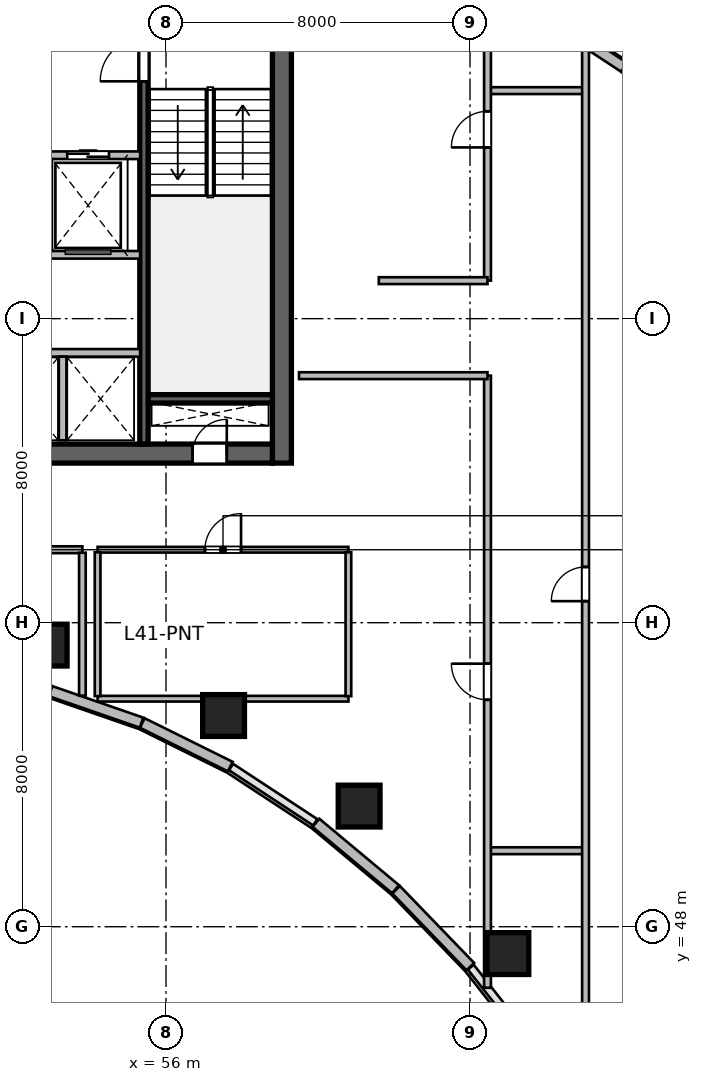
"""IFC4 building model, lengths in metres.
Left out: names, types, materials, properties, quantities, classifications, styles, units other than length and angle.
Written with IfcOpenShell. Run it as: python <this file> out.ifc"""

import sys

from ifc_helpers import new_model, si_unit, direction, frame, frame_2d, origin, origin_2d, place, context, subcontext, project, spatial, rectangle, circle, extrude, source, transform, mapped, element, fill, save


model = new_model("IFC4")
c1 = context("Model", 3, precision=1e-05, world=origin(), true_north=direction((0.0, 1.0)))
c2 = subcontext(c1, "Body", "Model", "MODEL_VIEW")
j1 = project(units=[si_unit("LENGTHUNIT", "METRE"), si_unit("PLANEANGLEUNIT", "RADIAN")], contexts=[c1])
p1 = place(None, origin())
s1 = spatial("IfcSite", under=j1, at=p1, CompositionType="ELEMENT")
p2 = place(p1, origin())
s2 = spatial("IfcBuilding", under=s1, at=p2, CompositionType="ELEMENT")
p3 = place(p2, frame((0.0, 0.0, 170.1)))
s3 = spatial("IfcBuildingStorey", under=s2, at=p3, CompositionType="ELEMENT", Elevation=170.1)
m1 = source(origin(), c2, "Body", "SweptSolid", [
    extrude(rectangle(XDim=12.0, YDim=0.5, at=frame_2d((6.0, 0.0))), origin(), (0.0, 0.0, 1.0), 3.9),
])
p4 = place(p3, frame((59.05, 60.2, 0.0), z_axis=(0.0, 0.0, 1.0), x_axis=(0.0, 1.0, 0.0)))
e1 = element("IfcWall", 1, at=p4, inside=s3, PredefinedType="SHEAR", context=c2, shape_type="MappedRepresentation", body=[
    mapped(m1, transform((0.0, 0.0, 0.0), scale=1.0)),
])
m2 = source(origin(), c2, "Body", "SweptSolid", [
    extrude(rectangle(XDim=21.6, YDim=0.5, at=frame_2d((10.8, 0.0))), origin(), (0.0, 0.0, 1.0), 3.9),
])
p5 = place(p3, frame((37.2, 60.45, 0.0), z_axis=(0.0, 0.0, 1.0), x_axis=(1.0, 0.0, 0.0)))
e2 = element("IfcWall", 2, at=p5, inside=s3, PredefinedType="SHEAR", context=c2, shape_type="MappedRepresentation", body=[
    mapped(m2, transform((0.0, 0.0, 0.0), scale=1.0)),
])
p6 = place(p5, frame((1.1, 0.0, 0.0)))
e3 = element("IfcOpeningElement", 3, at=p6, cuts=e2, PredefinedType="OPENING", context=c2, shape_type="SweptSolid", body=[
    extrude(rectangle(XDim=1.15, YDim=2.15, at=frame_2d((0.575, 1.075))), frame((0.0, 0.26, 0.0), z_axis=(0.0, -1.0, 0.0), x_axis=(1.0, 0.0, 0.0)), (0.0, 0.0, 1.0), 0.52),
])
p7 = place(p5, frame((19.5, 0.0, 0.0)))
e4 = element("IfcOpeningElement", 4, at=p7, cuts=e2, PredefinedType="OPENING", context=c2, shape_type="SweptSolid", body=[
    extrude(rectangle(XDim=0.9, YDim=2.1, at=frame_2d((0.45, 1.05))), frame((0.0, 0.26, 0.0), z_axis=(0.0, -1.0, 0.0), x_axis=(1.0, 0.0, 0.0)), (0.0, 0.0, 1.0), 0.52),
])
p8 = place(p5, frame((12.02, 0.0, 0.0)))
e5 = element("IfcOpeningElement", 5, at=p8, cuts=e2, PredefinedType="OPENING", context=c2, shape_type="SweptSolid", body=[
    extrude(rectangle(XDim=1.6, YDim=2.15, at=frame_2d((0.8, 1.075))), frame((0.0, 0.26, 0.0), z_axis=(0.0, -1.0, 0.0), x_axis=(1.0, 0.0, 0.0)), (0.0, 0.0, 1.0), 0.52),
])
m3 = source(origin(), c2, "Body", "SweptSolid", [
    extrude(rectangle(XDim=3.27, YDim=0.22, at=frame_2d((1.635, 0.0))), origin(), (0.0, 0.0, 1.0), 3.9),
])
p9 = place(p3, frame((55.53, 61.89, 0.0), z_axis=(0.0, 0.0, 1.0), x_axis=(1.0, 0.0, 0.0)))
e6 = element("IfcWall", 6, at=p9, inside=s3, PredefinedType="SHEAR", context=c2, shape_type="MappedRepresentation", body=[
    mapped(m3, transform((0.0, 0.0, 0.0), scale=1.0)),
])
m4 = source(origin(), c2, "Body", "SweptSolid", [
    extrude(rectangle(XDim=11.0, YDim=0.22, at=frame_2d((5.5, 0.0))), origin(), (0.0, 0.0, 1.0), 3.9),
])
p10 = place(p3, frame((55.42, 60.7, 0.0), z_axis=(0.0, 0.0, 1.0), x_axis=(0.0, 1.0, 0.0)))
e7 = element("IfcWall", 7, at=p10, inside=s3, PredefinedType="SHEAR", context=c2, shape_type="MappedRepresentation", body=[
    mapped(m4, transform((0.0, 0.0, 0.0), scale=1.0)),
])
p11 = place(p10, frame((9.545, 0.0, 0.0)))
e8 = element("IfcOpeningElement", 8, at=p11, cuts=e7, PredefinedType="OPENING", context=c2, shape_type="SweptSolid", body=[
    extrude(rectangle(XDim=1.15, YDim=2.15, at=frame_2d((0.575, 1.075))), frame((0.0, 0.12, 0.0), z_axis=(0.0, -1.0, 0.0), x_axis=(1.0, 0.0, 0.0)), (0.0, 0.0, 1.0), 0.24),
])
m5 = source(origin(), c2, "Body", "SweptSolid", [
    extrude(circle(Radius=0.55, at=origin_2d()), origin(), (0.0, 0.0, 1.0), 3.9),
])
for number, where, z_axis, x_axis in (
    (9, (52.846, 55.411, 0.0), (0.0, 0.0, 1.0), (0.143, 0.99, 0.0)),
    (10, (57.515, 53.558, 0.0), (0.0, 0.0, 1.0), (0.289, 0.957, 0.0)),
    (11, (61.082, 51.175, 0.0), (0.0, 0.0, 1.0), (0.409, 0.912, 0.0)),
    (12, (64.996, 47.294, 0.0), (0.0, 0.0, 1.0), (0.558, 0.83, 0.0)),
):
    element("IfcColumn", number, at=place(p3, frame(where, z_axis=z_axis, x_axis=x_axis)), inside=s3, PredefinedType="COLUMN", context=c2, shape_type="MappedRepresentation", body=[
        mapped(m5, transform((0.0, 0.0, 0.0), scale=1.0)),
    ])
m6 = source(origin(), c2, "Body", "SweptSolid", [
    extrude(rectangle(XDim=2.812, YDim=0.28, at=frame_2d((1.406, 0.0))), origin(), (0.0, 0.0, 1.0), 3.65),
])
p12 = place(p3, frame((64.008, 46.95, 0.0), z_axis=(0.0, 0.0, 1.0), x_axis=(-0.694583668785, 0.719411931411, 0.0)))
e13 = element("IfcWall", 13, at=p12, inside=s3, PredefinedType="SOLIDWALL", context=c2, shape_type="MappedRepresentation", body=[
    mapped(m6, transform((0.0, 0.0, 0.0), scale=1.0)),
])
m7 = source(origin(), c2, "Body", "SweptSolid", [
    extrude(rectangle(XDim=2.729, YDim=0.28, at=frame_2d((1.365, 0.0))), origin(), (0.0, 0.0, 1.0), 3.65),
])
p13 = place(p3, frame((62.041, 48.987, 0.0), z_axis=(0.0, 0.0, 1.0), x_axis=(-0.767957284255, 0.640501061326, 0.0)))
e14 = element("IfcWall", 14, at=p13, inside=s3, PredefinedType="SOLIDWALL", context=c2, shape_type="MappedRepresentation", body=[
    mapped(m7, transform((0.0, 0.0, 0.0), scale=1.0)),
])
m8 = source(origin(), c2, "Body", "SweptSolid", [
    extrude(rectangle(XDim=2.584, YDim=0.28, at=frame_2d((1.292, 0.0))), origin(), (0.0, 0.0, 1.0), 3.65),
])
p14 = place(p3, frame((57.692, 52.213, 0.0), z_axis=(0.0, 0.0, 1.0), x_axis=(-0.895989792847, 0.44407464588, 0.0)))
e15 = element("IfcWall", 15, at=p14, inside=s3, PredefinedType="SOLIDWALL", context=c2, shape_type="MappedRepresentation", body=[
    mapped(m8, transform((0.0, 0.0, 0.0), scale=1.0)),
])
m9 = source(origin(), c2, "Body", "SweptSolid", [
    extrude(rectangle(XDim=2.53, YDim=0.28, at=frame_2d((1.265, 0.0))), origin(), (0.0, 0.0, 1.0), 3.65),
])
p15 = place(p3, frame((55.355, 53.37, 0.0), z_axis=(0.0, 0.0, 1.0), x_axis=(-0.944872429646, 0.327438683872, 0.0)))
e16 = element("IfcWall", 16, at=p15, inside=s3, PredefinedType="SOLIDWALL", context=c2, shape_type="MappedRepresentation", body=[
    mapped(m9, transform((0.0, 0.0, 0.0), scale=1.0)),
])
m10 = source(origin(), c2, "Body", "SweptSolid", [
    extrude(rectangle(XDim=4.501, YDim=0.28, at=frame_2d((2.25, 0.0))), origin(), (0.0, 0.0, 1.0), 3.65),
])
p16 = place(p3, frame((64.298, 73.08, 0.0), z_axis=(0.0, 0.0, 1.0), x_axis=(0.835984920737, -0.548752414391, 0.0)))
e17 = element("IfcWall", 17, at=p16, inside=s3, PredefinedType="SOLIDWALL", context=c2, shape_type="MappedRepresentation", body=[
    mapped(m10, transform((0.0, 0.0, 0.0), scale=1.0)),
])
m11 = source(origin(), c2, "Body", "SweptSolid", [
    extrude(rectangle(XDim=4.634, YDim=0.28, at=frame_2d((2.317, 0.0))), origin(), (0.0, 0.0, 1.0), 3.65),
])
p17 = place(p3, frame((68.061, 70.61, 0.0), z_axis=(0.0, 0.0, 1.0), x_axis=(0.767910229096, -0.640557475993, 0.0)))
e18 = element("IfcWall", 18, at=p17, inside=s3, PredefinedType="SOLIDWALL", context=c2, shape_type="MappedRepresentation", body=[
    mapped(m11, transform((0.0, 0.0, 0.0), scale=1.0)),
])
m12 = source(origin(), c2, "Body", "SweptSolid", [
    extrude(rectangle(XDim=5.62, YDim=0.2, at=frame_2d((2.81, 0.0))), origin(), (0.0, 0.0, 1.0), 3.65),
])
p18 = place(p3, frame((49.7, 68.3, 0.0), z_axis=(0.0, 0.0, 1.0), x_axis=(1.0, 0.0, 0.0)))
e19 = element("IfcWall", 19, at=p18, inside=s3, PredefinedType="SOLIDWALL", context=c2, shape_type="MappedRepresentation", body=[
    mapped(m12, transform((0.0, 0.0, 0.0), scale=1.0)),
])
p19 = place(p18, frame((1.6, 0.0, 0.0)))
e20 = element("IfcOpeningElement", 20, at=p19, cuts=e19, PredefinedType="OPENING", context=c2, shape_type="SweptSolid", body=[
    extrude(rectangle(XDim=1.1, YDim=2.15, at=frame_2d((0.55, 1.075))), frame((0.0, 0.11, 0.0), z_axis=(0.0, -1.0, 0.0), x_axis=(1.0, 0.0, 0.0)), (0.0, 0.0, 1.0), 0.22),
])
p20 = place(p18, frame((3.7, 0.0, 0.0)))
e21 = element("IfcOpeningElement", 21, at=p20, cuts=e19, PredefinedType="OPENING", context=c2, shape_type="SweptSolid", body=[
    extrude(rectangle(XDim=1.1, YDim=2.15, at=frame_2d((0.55, 1.075))), frame((0.0, 0.11, 0.0), z_axis=(0.0, -1.0, 0.0), x_axis=(1.0, 0.0, 0.0)), (0.0, 0.0, 1.0), 0.22),
])
p21 = place(p3, frame((49.7, 65.68, 0.0), z_axis=(0.0, 0.0, 1.0), x_axis=(1.0, 0.0, 0.0)))
e22 = element("IfcWall", 22, at=p21, inside=s3, PredefinedType="SOLIDWALL", context=c2, shape_type="MappedRepresentation", body=[
    mapped(m12, transform((0.0, 0.0, 0.0), scale=1.0)),
])
m13 = source(origin(), c2, "Body", "SweptSolid", [
    extrude(rectangle(XDim=4.1, YDim=0.2, at=frame_2d((2.05, 0.0))), origin(), (0.0, 0.0, 1.0), 3.65),
])
p22 = place(p3, frame((51.22, 63.1, 0.0), z_axis=(0.0, 0.0, 1.0), x_axis=(1.0, 0.0, 0.0)))
e23 = element("IfcWall", 23, at=p22, inside=s3, PredefinedType="SOLIDWALL", context=c2, shape_type="MappedRepresentation", body=[
    mapped(m13, transform((0.0, 0.0, 0.0), scale=1.0)),
])
m14 = source(origin(), c2, "Body", "SweptSolid", [
    extrude(rectangle(XDim=2.2, YDim=0.2, at=frame_2d((1.1, 0.0))), origin(), (0.0, 0.0, 1.0), 3.65),
])
p23 = place(p3, frame((53.28, 60.8, 0.0), z_axis=(0.0, 0.0, 1.0), x_axis=(0.0, 1.0, 0.0)))
e24 = element("IfcWall", 24, at=p23, inside=s3, PredefinedType="SOLIDWALL", context=c2, shape_type="MappedRepresentation", body=[
    mapped(m14, transform((0.0, 0.0, 0.0), scale=1.0)),
])
m15 = source(origin(), c2, "Body", "SweptSolid", [
    extrude(rectangle(XDim=3.248, YDim=0.18, at=frame_2d((1.624, 0.0))), origin(), (0.0, 0.0, 1.0), 3.65),
])
p24 = place(p3, frame((50.552, 57.92, 0.0), z_axis=(0.0, 0.0, 1.0), x_axis=(1.0, 0.0, 0.0)))
e25 = element("IfcWall", 25, at=p24, inside=s3, PredefinedType="PLUMBINGWALL", context=c2, shape_type="MappedRepresentation", body=[
    mapped(m15, transform((0.0, 0.0, 0.0), scale=1.0)),
])
p25 = place(p24, frame((1.149, 0.0, 0.0)))
e26 = element("IfcOpeningElement", 26, at=p25, cuts=e25, PredefinedType="OPENING", context=c2, shape_type="SweptSolid", body=[
    extrude(rectangle(XDim=0.95, YDim=2.12, at=frame_2d((0.475, 1.06))), frame((0.0, 0.1, 0.0), z_axis=(0.0, -1.0, 0.0), x_axis=(1.0, 0.0, 0.0)), (0.0, 0.0, 1.0), 0.2),
])
m16 = source(origin(), c2, "Body", "SweptSolid", [
    extrude(rectangle(XDim=3.763, YDim=0.175, at=frame_2d((1.881, 0.0))), origin(), (0.0, 0.0, 1.0), 3.65),
])
p26 = place(p3, frame((53.8, 54.079, 0.0), z_axis=(0.0, 0.0, 1.0), x_axis=(0.0, 1.0, 0.0)))
e27 = element("IfcWall", 27, at=p26, inside=s3, PredefinedType="PARTITIONING", context=c2, shape_type="MappedRepresentation", body=[
    mapped(m16, transform((0.0, 0.0, 0.0), scale=1.0)),
])
m17 = source(origin(), c2, "Body", "SweptSolid", [
    extrude(rectangle(XDim=6.6, YDim=0.15, at=frame_2d((3.3, 0.0))), origin(), (0.0, 0.0, 1.0), 3.095),
])
p27 = place(p3, frame((54.2, 54.0, 0.0), z_axis=(0.0, 0.0, 1.0), x_axis=(1.0, 0.0, 0.0)))
e28 = element("IfcWall", 28, at=p27, inside=s3, PredefinedType="PARTITIONING", context=c2, shape_type="MappedRepresentation", body=[
    mapped(m17, transform((0.0, 0.0, 0.0), scale=1.0)),
])
m18 = source(origin(), c2, "Body", "SweptSolid", [
    extrude(rectangle(XDim=6.6, YDim=0.15, at=frame_2d((3.3, 0.0))), origin(), (0.0, 0.0, 1.0), 3.65),
])
p28 = place(p3, frame((54.2, 57.92, 0.0), z_axis=(0.0, 0.0, 1.0), x_axis=(1.0, 0.0, 0.0)))
e29 = element("IfcWall", 29, at=p28, inside=s3, PredefinedType="PARTITIONING", context=c2, shape_type="MappedRepresentation", body=[
    mapped(m18, transform((0.0, 0.0, 0.0), scale=1.0)),
])
p29 = place(p28, frame((2.825, 0.0, 0.0)))
e30 = element("IfcOpeningElement", 30, at=p29, cuts=e29, PredefinedType="OPENING", context=c2, shape_type="SweptSolid", body=[
    extrude(rectangle(XDim=0.95, YDim=2.1, at=frame_2d((0.475, 1.05))), frame((0.0, 0.085, 0.0), z_axis=(0.0, -1.0, 0.0), x_axis=(1.0, 0.0, 0.0)), (0.0, 0.0, 1.0), 0.17),
])
m19 = source(origin(), c2, "Body", "SweptSolid", [
    extrude(rectangle(XDim=3.785, YDim=0.15, at=frame_2d((1.893, 0.0))), origin(), (0.0, 0.0, 1.0), 3.65),
])
for number, where, z_axis, x_axis in (
    (31, (54.2, 54.067, 0.0), (0.0, 0.0, 1.0), (0.0, 1.0, 0.0)),
    (32, (60.8, 54.067, 0.0), (0.0, 0.0, 1.0), (0.0, 1.0, 0.0)),
):
    element("IfcWall", number, at=place(p3, frame(where, z_axis=z_axis, x_axis=x_axis)), inside=s3, PredefinedType="PARTITIONING", context=c2, shape_type="MappedRepresentation", body=[
        mapped(m19, transform((0.0, 0.0, 0.0), scale=1.0)),
    ])
m20 = source(origin(), c2, "Body", "SweptSolid", [
    extrude(rectangle(XDim=2.5, YDim=0.18, at=frame_2d((1.25, 0.0))), origin(), (0.0, 0.0, 1.0), 3.65),
])
p30 = place(p3, frame((64.5, 50.0, 0.0), z_axis=(0.0, 0.0, 1.0), x_axis=(1.0, 0.0, 0.0)))
e33 = element("IfcWall", 33, at=p30, inside=s3, PredefinedType="PLUMBINGWALL", context=c2, shape_type="MappedRepresentation", body=[
    mapped(m20, transform((0.0, 0.0, 0.0), scale=1.0)),
])
m21 = source(origin(), c2, "Body", "SweptSolid", [
    extrude(rectangle(XDim=2.5, YDim=0.18, at=frame_2d((1.25, 0.0))), origin(), (0.0, 0.0, 1.0), 3.022),
])
p31 = place(p3, frame((64.5, 70.0, 0.0), z_axis=(0.0, 0.0, 1.0), x_axis=(1.0, 0.0, 0.0)))
e34 = element("IfcWall", 34, at=p31, inside=s3, PredefinedType="PLUMBINGWALL", context=c2, shape_type="MappedRepresentation", body=[
    mapped(m21, transform((0.0, 0.0, 0.0), scale=1.0)),
])
m22 = source(origin(), c2, "Body", "SweptSolid", [
    extrude(rectangle(XDim=28.503, YDim=0.18, at=frame_2d((14.251, 0.0))), origin(), (0.0, 0.0, 1.0), 2.942),
])
p32 = place(p3, frame((67.04, 42.765, 0.0), z_axis=(0.0, 0.0, 1.0), x_axis=(0.0, 1.0, 0.0)))
e35 = element("IfcWall", 35, at=p32, inside=s3, PredefinedType="PLUMBINGWALL", context=c2, shape_type="MappedRepresentation", body=[
    mapped(m22, transform((0.0, 0.0, 0.0), scale=1.0)),
])
p33 = place(p32, frame((13.802, 0.0, 0.0)))
e36 = element("IfcOpeningElement", 36, at=p33, cuts=e35, PredefinedType="OPENING", context=c2, shape_type="SweptSolid", body=[
    extrude(rectangle(XDim=0.9, YDim=2.08, at=frame_2d((0.45, 1.04))), frame((0.0, 0.1, 0.0), z_axis=(0.0, -1.0, 0.0), x_axis=(1.0, 0.0, 0.0)), (0.0, 0.0, 1.0), 0.2),
])
m23 = source(origin(), c2, "Body", "SweptSolid", [
    extrude(rectangle(XDim=16.106, YDim=0.18, at=frame_2d((8.053, 0.0))), origin(), (0.0, 0.0, 1.0), 2.942),
])
p34 = place(p3, frame((64.46, 46.394, 0.0), z_axis=(0.0, 0.0, 1.0), x_axis=(0.0, 1.0, 0.0)))
e37 = element("IfcWall", 37, at=p34, inside=s3, PredefinedType="PLUMBINGWALL", context=c2, shape_type="MappedRepresentation", body=[
    mapped(m23, transform((0.0, 0.0, 0.0), scale=1.0)),
])
p35 = place(p34, frame((7.578, 0.0, 0.0)))
e38 = element("IfcOpeningElement", 38, at=p35, cuts=e37, PredefinedType="OPENING", context=c2, shape_type="SweptSolid", body=[
    extrude(rectangle(XDim=0.95, YDim=2.1, at=frame_2d((0.475, 1.05))), frame((0.0, 0.1, 0.0), z_axis=(0.0, -1.0, 0.0), x_axis=(1.0, 0.0, 0.0)), (0.0, 0.0, 1.0), 0.2),
])
m24 = source(origin(), c2, "Body", "SweptSolid", [
    extrude(rectangle(XDim=4.96, YDim=0.18, at=frame_2d((2.48, 0.0))), origin(), (0.0, 0.0, 1.0), 3.65),
])
p36 = place(p3, frame((59.5, 62.5, 0.0), z_axis=(0.0, 0.0, 1.0), x_axis=(1.0, 0.0, 0.0)))
e39 = element("IfcWall", 39, at=p36, inside=s3, PredefinedType="PLUMBINGWALL", context=c2, shape_type="MappedRepresentation", body=[
    mapped(m24, transform((0.0, 0.0, 0.0), scale=1.0)),
])
m25 = source(origin(), c2, "Body", "SweptSolid", [
    extrude(rectangle(XDim=7.962, YDim=0.18, at=frame_2d((3.981, 0.0))), origin(), (0.0, 0.0, 1.0), 3.65),
])
p37 = place(p3, frame((64.46, 65.0, 0.0), z_axis=(0.0, 0.0, 1.0), x_axis=(0.0, 1.0, 0.0)))
e40 = element("IfcWall", 40, at=p37, inside=s3, PredefinedType="PLUMBINGWALL", context=c2, shape_type="MappedRepresentation", body=[
    mapped(m25, transform((0.0, 0.0, 0.0), scale=1.0)),
])
p38 = place(p37, frame((3.506, 0.0, 0.0)))
e41 = element("IfcOpeningElement", 41, at=p38, cuts=e40, PredefinedType="OPENING", context=c2, shape_type="SweptSolid", body=[
    extrude(rectangle(XDim=0.95, YDim=2.1, at=frame_2d((0.475, 1.05))), frame((0.0, 0.1, 0.0), z_axis=(0.0, -1.0, 0.0), x_axis=(1.0, 0.0, 0.0)), (0.0, 0.0, 1.0), 0.2),
])
m26 = source(origin(), c2, "Body", "SweptSolid", [
    extrude(rectangle(XDim=2.86, YDim=0.18, at=frame_2d((1.43, 0.0))), origin(), (0.0, 0.0, 1.0), 3.65),
])
p39 = place(p3, frame((61.6, 65.0, 0.0), z_axis=(0.0, 0.0, 1.0), x_axis=(1.0, 0.0, 0.0)))
e42 = element("IfcWall", 42, at=p39, inside=s3, PredefinedType="PLUMBINGWALL", context=c2, shape_type="MappedRepresentation", body=[
    mapped(m26, transform((0.0, 0.0, 0.0), scale=1.0)),
])
m27 = source(origin(), c2, "Body", "SweptSolid", [
    extrude(rectangle(XDim=0.9, YDim=2.1, at=frame_2d((0.45, 1.05))), frame((0.0, 0.025, 0.0), z_axis=(0.0, -1.0, 0.0), x_axis=(1.0, 0.0, 0.0)), (0.0, 0.0, 1.0), 0.05),
])
p40 = place(p7, origin())
e43 = element("IfcDoor", 43, at=p40, inside=s3, OperationType="SINGLE_SWING_RIGHT", PredefinedType="DOOR", context=c2, shape_type="MappedRepresentation", body=[
    mapped(m27, transform((0.0, 0.0, 0.0), scale=1.0)),
])
fill(e4, e43)
m28 = source(origin(), c2, "Body", "SweptSolid", [
    extrude(rectangle(XDim=1.15, YDim=2.15, at=frame_2d((0.575, 1.075))), frame((0.0, 0.025, 0.0), z_axis=(0.0, -1.0, 0.0), x_axis=(1.0, 0.0, 0.0)), (0.0, 0.0, 1.0), 0.05),
])
p41 = place(p11, origin())
e44 = element("IfcDoor", 44, at=p41, inside=s3, OperationType="SINGLE_SWING_LEFT", PredefinedType="DOOR", context=c2, shape_type="MappedRepresentation", body=[
    mapped(m28, transform((0.0, 0.0, 0.0), scale=1.0)),
])
fill(e8, e44)
m29 = source(origin(), c2, "Body", "SweptSolid", [
    extrude(rectangle(XDim=1.1, YDim=2.15, at=frame_2d((0.55, 1.075))), frame((0.0, 0.025, 0.0), z_axis=(0.0, -1.0, 0.0), x_axis=(1.0, 0.0, 0.0)), (0.0, 0.0, 1.0), 0.05),
])
p42 = place(p20, origin())
e45 = element("IfcDoor", 45, at=p42, inside=s3, OperationType="DOUBLE_DOOR_SLIDING", PredefinedType="DOOR", context=c2, shape_type="MappedRepresentation", body=[
    mapped(m29, transform((0.0, 0.0, 0.0), scale=1.0)),
])
fill(e21, e45)
m30 = source(origin(), c2, "Body", "SweptSolid", [
    extrude(rectangle(XDim=0.95, YDim=2.1, at=frame_2d((0.475, 1.05))), frame((0.0, 0.025, 0.0), z_axis=(0.0, -1.0, 0.0), x_axis=(1.0, 0.0, 0.0)), (0.0, 0.0, 1.0), 0.05),
])
p43 = place(p29, origin())
e46 = element("IfcDoor", 46, at=p43, inside=s3, OperationType="SINGLE_SWING_RIGHT", PredefinedType="DOOR", context=c2, shape_type="MappedRepresentation", body=[
    mapped(m30, transform((0.0, 0.0, 0.0), scale=1.0)),
])
fill(e30, e46)
m31 = source(origin(), c2, "Body", "SweptSolid", [
    extrude(rectangle(XDim=0.9, YDim=2.08, at=frame_2d((0.45, 1.04))), frame((0.0, 0.025, 0.0), z_axis=(0.0, -1.0, 0.0), x_axis=(1.0, 0.0, 0.0)), (0.0, 0.0, 1.0), 0.05),
])
p44 = place(p33, origin())
e47 = element("IfcDoor", 47, at=p44, inside=s3, OperationType="SINGLE_SWING_LEFT", PredefinedType="DOOR", context=c2, shape_type="MappedRepresentation", body=[
    mapped(m31, transform((0.0, 0.0, 0.0), scale=1.0)),
])
fill(e36, e47)
p45 = place(p35, origin())
e48 = element("IfcDoor", 48, at=p45, inside=s3, OperationType="SINGLE_SWING_RIGHT", PredefinedType="DOOR", context=c2, shape_type="MappedRepresentation", body=[
    mapped(m30, transform((0.0, 0.0, 0.0), scale=1.0)),
])
fill(e38, e48)
p46 = place(p38, origin())
e49 = element("IfcDoor", 49, at=p46, inside=s3, OperationType="SINGLE_SWING_LEFT", PredefinedType="DOOR", context=c2, shape_type="MappedRepresentation", body=[
    mapped(m30, transform((0.0, 0.0, 0.0), scale=1.0)),
])
fill(e41, e49)
save(model, sys.argv[1])
